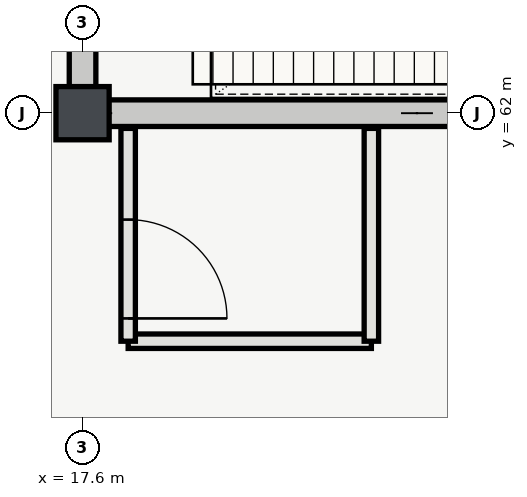
"""IFC4 building model, lengths in metres.
Left out: names, types, materials, properties, quantities, classifications, styles, units other than length and angle.
Written with IfcOpenShell. Run it as: python <this file> out.ifc"""

import sys

from ifc_helpers import new_model, si_unit, direction, frame, frame_2d, origin, origin_2d, place, context, subcontext, project, spatial, rectangle, extrude, element, fill, save


model = new_model("IFC4")
c1 = context("Model", 3, precision=1e-05, world=origin(), true_north=direction((0.0, 1.0)))
c2 = subcontext(c1, "Body", "Model", "MODEL_VIEW")
j1 = project(units=[si_unit("LENGTHUNIT", "METRE"), si_unit("PLANEANGLEUNIT", "RADIAN")], contexts=[c1])
p1 = place(None, origin())
s1 = spatial("IfcSite", under=j1, at=p1, CompositionType="ELEMENT")
p2 = place(p1, origin())
s2 = spatial("IfcBuilding", under=s1, at=p2, CompositionType="ELEMENT")
p3 = place(p2, origin())
s3 = spatial("IfcBuildingStorey", under=s2, at=p3, CompositionType="ELEMENT", Elevation=0.0)
p4 = place(p3, frame((17.6, 62.0, 0.0), z_axis=(0.0, 0.0, 1.0), x_axis=(1.0, 0.0, 0.0)))
e1 = element("IfcColumn", 1, at=p4, inside=s3, PredefinedType="COLUMN", context=c2, shape_type="SweptSolid", body=[
    extrude(rectangle(XDim=0.7, YDim=0.7, at=origin_2d()), origin(), (0.0, 0.0, 1.0), 5.4),
])
p5 = place(p3, frame((17.425, 62.0, 0.0), z_axis=(0.0, 0.0, 1.0), x_axis=(1.0, 0.0, 0.0)))
e2 = element("IfcWall", 2, at=p5, inside=s3, PredefinedType="SHEAR", context=c2, shape_type="SweptSolid", body=[
    extrude(rectangle(XDim=9.15, YDim=0.35, at=frame_2d((4.575, 0.0))), origin(), (0.0, 0.0, 1.0), 5.12),
])
p6 = place(p3, frame((17.6, 62.175, 0.0), z_axis=(0.0, 0.0, 1.0), x_axis=(0.0, 1.0, 0.0)))
e3 = element("IfcWall", 3, at=p6, inside=s3, PredefinedType="SHEAR", context=c2, shape_type="SweptSolid", body=[
    extrude(rectangle(XDim=7.65, YDim=0.35, at=frame_2d((3.825, 0.0))), origin(), (0.0, 0.0, 1.0), 5.12),
])
p7 = place(p6, frame((1.625, 0.0, 0.0)))
e4 = element("IfcOpeningElement", 4, at=p7, cuts=e3, PredefinedType="OPENING", context=c2, shape_type="SweptSolid", body=[
    extrude(rectangle(XDim=1.4, YDim=2.2, at=frame_2d((0.7, 1.1))), frame((0.0, 0.185, 0.0), z_axis=(0.0, -1.0, 0.0), x_axis=(1.0, 0.0, 0.0)), (0.0, 0.0, 1.0), 0.37),
])
p8 = place(p6, frame((5.675, 0.0, 0.0)))
e5 = element("IfcOpeningElement", 5, at=p8, cuts=e3, PredefinedType="OPENING", context=c2, shape_type="SweptSolid", body=[
    extrude(rectangle(XDim=1.0, YDim=2.15, at=frame_2d((0.5, 1.075))), frame((0.0, 0.185, 0.0), z_axis=(0.0, -1.0, 0.0), x_axis=(1.0, 0.0, 0.0)), (0.0, 0.0, 1.0), 0.37),
])
p9 = place(p3, frame((18.2, 59.0, 0.0), z_axis=(0.0, 0.0, 1.0), x_axis=(1.0, 0.0, 0.0)))
e6 = element("IfcWall", 6, at=p9, inside=s3, PredefinedType="PARTITIONING", context=c2, shape_type="SweptSolid", body=[
    extrude(rectangle(XDim=3.2, YDim=0.19, at=frame_2d((1.6, 0.0))), origin(), (0.0, 0.0, 1.0), 5.12),
])
p10 = place(p3, frame((18.2, 61.8, 0.0), z_axis=(0.0, 0.0, 1.0), x_axis=(0.0, -1.0, 0.0)))
e7 = element("IfcWall", 7, at=p10, inside=s3, PredefinedType="PARTITIONING", context=c2, shape_type="SweptSolid", body=[
    extrude(rectangle(XDim=2.8, YDim=0.19, at=frame_2d((1.4, 0.0))), origin(), (0.0, 0.0, 1.0), 5.12),
])
p11 = place(p10, frame((1.2, 0.0, 0.0)))
e8 = element("IfcOpeningElement", 8, at=p11, cuts=e7, PredefinedType="OPENING", context=c2, shape_type="SweptSolid", body=[
    extrude(rectangle(XDim=1.3, YDim=2.2, at=frame_2d((0.65, 1.1))), frame((0.0, 0.105, 0.0), z_axis=(0.0, -1.0, 0.0), x_axis=(1.0, 0.0, 0.0)), (0.0, 0.0, 1.0), 0.21),
])
p12 = place(p3, frame((21.4, 59.0, 0.0), z_axis=(0.0, 0.0, 1.0), x_axis=(0.0, 1.0, 0.0)))
e9 = element("IfcWall", 9, at=p12, inside=s3, PredefinedType="PARTITIONING", context=c2, shape_type="SweptSolid", body=[
    extrude(rectangle(XDim=2.8, YDim=0.19, at=frame_2d((1.4, 0.0))), origin(), (0.0, 0.0, 1.0), 5.12),
])
p13 = place(p11, origin())
e10 = element("IfcDoor", 10, at=p13, inside=s3, OperationType="SINGLE_SWING_RIGHT", PredefinedType="DOOR", context=c2, shape_type="SweptSolid", body=[
    extrude(rectangle(XDim=1.3, YDim=2.2, at=frame_2d((0.65, 1.1))), frame((0.0, 0.025, 0.0), z_axis=(0.0, -1.0, 0.0), x_axis=(1.0, 0.0, 0.0)), (0.0, 0.0, 1.0), 0.05),
])
fill(e8, e10)
save(model, sys.argv[1])
